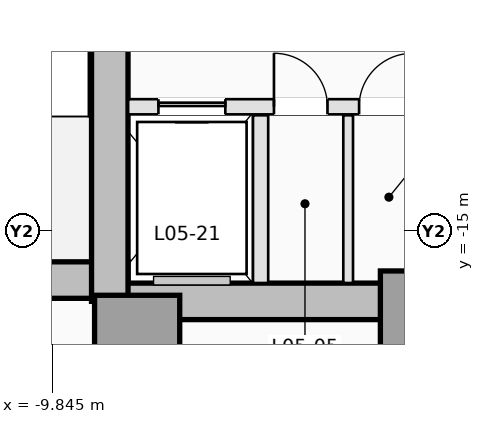
"""IFC4 building model, lengths in metres.
Left out: names, types, materials, properties, quantities, classifications, styles, units other than length and angle.
Written with IfcOpenShell. Run it as: python <this file> out.ifc"""

import sys

from ifc_helpers import new_model, si_unit, direction, frame, frame_2d, origin, origin_2d, place, context, subcontext, project, spatial, rectangle, extrude, element, fill, save


model = new_model("IFC4")
c1 = context("Model", 3, precision=1e-05, world=origin(), true_north=direction((0.0, 1.0)))
c2 = subcontext(c1, "Body", "Model", "MODEL_VIEW")
j1 = project(units=[si_unit("LENGTHUNIT", "METRE"), si_unit("PLANEANGLEUNIT", "RADIAN")], contexts=[c1])
p1 = place(None, origin())
s1 = spatial("IfcSite", under=j1, at=p1, CompositionType="ELEMENT")
p2 = place(p1, origin())
s2 = spatial("IfcBuilding", under=s1, at=p2, CompositionType="ELEMENT")
p3 = place(p2, frame((0.0, 0.0, 23.0)))
s3 = spatial("IfcBuildingStorey", under=s2, at=p3, CompositionType="ELEMENT", Elevation=23.0)
p4 = place(p3, frame((-12.8, -15.8, 0.0), z_axis=(0.0, 0.0, 1.0), x_axis=(1.0, 0.0, 0.0)))
e1 = element("IfcWall", 1, at=p4, inside=s3, PredefinedType="SHEAR", context=c2, shape_type="SweptSolid", body=[
    extrude(rectangle(XDim=4.2, YDim=0.6, at=frame_2d((2.1, 0.0))), origin(), (0.0, 0.0, 1.0), 4.6),
])
p5 = place(p3, frame((-8.9, -16.15, 0.0), z_axis=(0.0, 0.0, 1.0), x_axis=(1.0, 0.0, 0.0)))
e2 = element("IfcWall", 2, at=p5, inside=s3, PredefinedType="SHEAR", context=c2, shape_type="SweptSolid", body=[
    extrude(rectangle(XDim=5.15, YDim=0.6, at=frame_2d((2.575, 0.0))), origin(), (0.0, 0.0, 1.0), 4.6),
])
p6 = place(p3, frame((-8.9, -16.15, 0.0), z_axis=(0.0, 0.0, 1.0), x_axis=(0.0, 1.0, 0.0)))
e3 = element("IfcWall", 3, at=p6, inside=s3, PredefinedType="SHEAR", context=c2, shape_type="SweptSolid", body=[
    extrude(rectangle(XDim=5.95, YDim=0.6, at=frame_2d((2.975, 0.0))), origin(), (0.0, 0.0, 1.0), 4.6),
])
for number, where, z_axis, x_axis in (
    (4, (-8.45, -16.75, 0.0), (0.0, 0.0, 1.0), (1.0, 0.0, 0.0)),
    (5, (-3.75, -16.35, 0.0), (0.0, 0.0, 1.0), (1.0, 0.0, 0.0)),
):
    element("IfcColumn", number, at=place(p3, frame(where, z_axis=z_axis, x_axis=x_axis)), inside=s3, PredefinedType="COLUMN", context=c2, shape_type="SweptSolid", body=[
        extrude(rectangle(XDim=1.4, YDim=1.4, at=origin_2d()), origin(), (0.0, 0.0, 1.0), 4.6),
    ])
p7 = place(p3, frame((-8.598, -12.95, 0.0), z_axis=(0.0, 0.0, 1.0), x_axis=(1.0, 0.0, 0.0)))
e6 = element("IfcWall", 6, at=p7, inside=s3, PredefinedType="PARTITIONING", context=c2, shape_type="SweptSolid", body=[
    extrude(rectangle(XDim=4.918, YDim=0.25, at=frame_2d((2.459, 0.0))), origin(), (0.0, 0.0, 1.0), 4.35),
])
p8 = place(p7, frame((0.498, 0.0, 0.0)))
e7 = element("IfcOpeningElement", 7, at=p8, cuts=e6, PredefinedType="OPENING", context=c2, shape_type="SweptSolid", body=[
    extrude(rectangle(XDim=1.1, YDim=2.15, at=frame_2d((0.55, 1.075))), frame((0.0, 0.135, 0.0), z_axis=(0.0, -1.0, 0.0), x_axis=(1.0, 0.0, 0.0)), (0.0, 0.0, 1.0), 0.27),
])
p9 = place(p7, frame((2.398, 0.0, 0.0)))
e8 = element("IfcOpeningElement", 8, at=p9, cuts=e6, PredefinedType="OPENING", context=c2, shape_type="SweptSolid", body=[
    extrude(rectangle(XDim=0.88, YDim=2.1, at=frame_2d((0.44, 1.05))), frame((0.0, 0.135, 0.0), z_axis=(0.0, -1.0, 0.0), x_axis=(1.0, 0.0, 0.0)), (0.0, 0.0, 1.0), 0.27),
])
p10 = place(p7, frame((3.798, 0.0, 0.0)))
e9 = element("IfcOpeningElement", 9, at=p10, cuts=e6, PredefinedType="OPENING", context=c2, shape_type="SweptSolid", body=[
    extrude(rectangle(XDim=0.88, YDim=2.1, at=frame_2d((0.44, 1.05))), frame((0.0, 0.135, 0.0), z_axis=(0.0, -1.0, 0.0), x_axis=(1.0, 0.0, 0.0)), (0.0, 0.0, 1.0), 0.27),
])
p11 = place(p3, frame((-6.42, -15.848, 0.0), z_axis=(0.0, 0.0, 1.0), x_axis=(0.0, 1.0, 0.0)))
e10 = element("IfcWall", 10, at=p11, inside=s3, PredefinedType="PARTITIONING", context=c2, shape_type="SweptSolid", body=[
    extrude(rectangle(XDim=2.758, YDim=0.25, at=frame_2d((1.379, 0.0))), origin(), (0.0, 0.0, 1.0), 4.35),
])
p12 = place(p3, frame((-4.98, -15.848, 0.0), z_axis=(0.0, 0.0, 1.0), x_axis=(0.0, 1.0, 0.0)))
e11 = element("IfcWall", 11, at=p12, inside=s3, PredefinedType="PARTITIONING", context=c2, shape_type="SweptSolid", body=[
    extrude(rectangle(XDim=2.758, YDim=0.16, at=frame_2d((1.379, 0.0))), origin(), (0.0, 0.0, 1.0), 4.35),
])
p13 = place(p8, origin())
e12 = element("IfcDoor", 12, at=p13, inside=s3, OperationType="SLIDING_TO_LEFT", PredefinedType="DOOR", context=c2, shape_type="SweptSolid", body=[
    extrude(rectangle(XDim=1.1, YDim=2.15, at=frame_2d((0.55, 1.075))), frame((0.0, 0.025, 0.0), z_axis=(0.0, -1.0, 0.0), x_axis=(1.0, 0.0, 0.0)), (0.0, 0.0, 1.0), 0.05),
])
fill(e7, e12)
p14 = place(p9, origin())
e13 = element("IfcDoor", 13, at=p14, inside=s3, OperationType="SINGLE_SWING_LEFT", PredefinedType="TRAPDOOR", context=c2, shape_type="SweptSolid", body=[
    extrude(rectangle(XDim=0.88, YDim=2.1, at=frame_2d((0.44, 1.05))), frame((0.0, 0.025, 0.0), z_axis=(0.0, -1.0, 0.0), x_axis=(1.0, 0.0, 0.0)), (0.0, 0.0, 1.0), 0.05),
])
fill(e8, e13)
p15 = place(p10, origin())
e14 = element("IfcDoor", 14, at=p15, inside=s3, OperationType="SINGLE_SWING_RIGHT", PredefinedType="TRAPDOOR", context=c2, shape_type="SweptSolid", body=[
    extrude(rectangle(XDim=0.88, YDim=2.1, at=frame_2d((0.44, 1.05))), frame((0.0, 0.025, 0.0), z_axis=(0.0, -1.0, 0.0), x_axis=(1.0, 0.0, 0.0)), (0.0, 0.0, 1.0), 0.05),
])
fill(e9, e14)
save(model, sys.argv[1])
